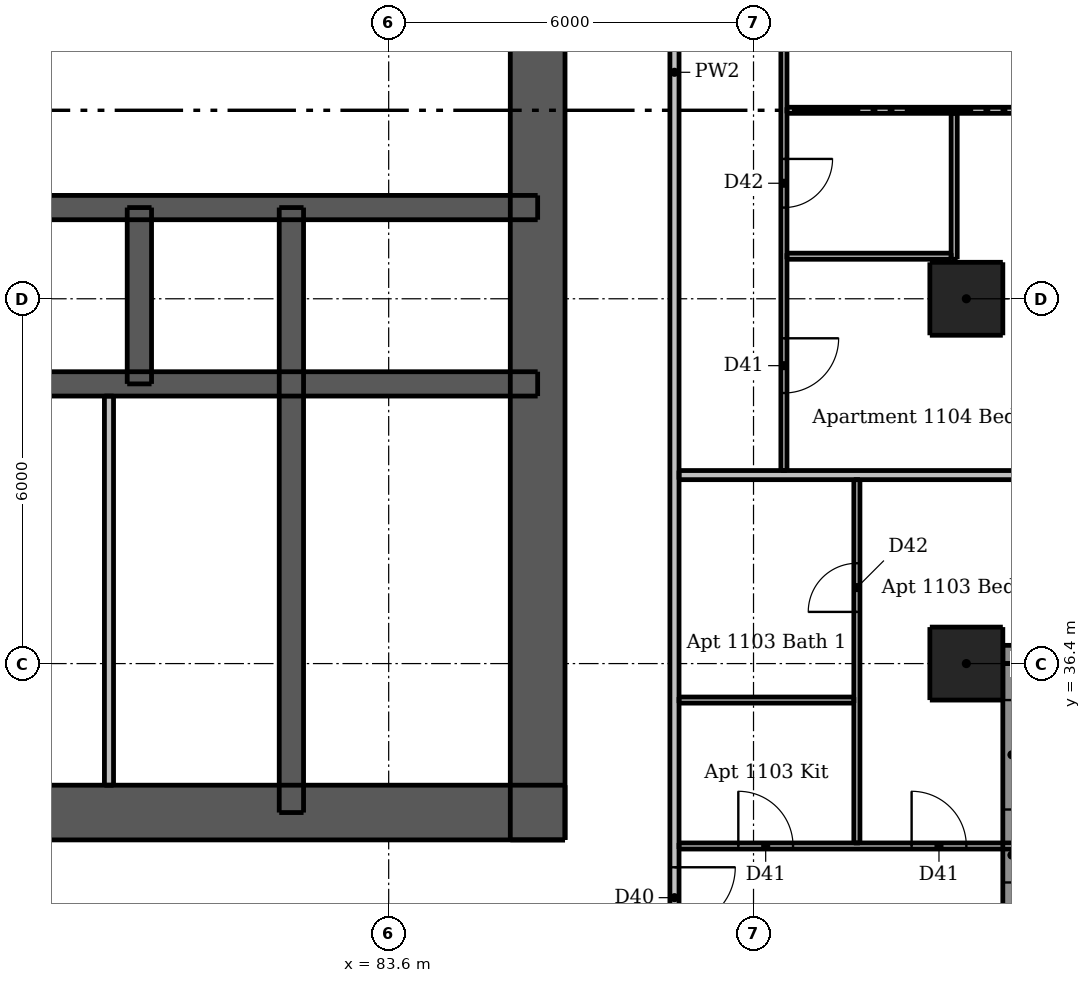
"""IFC4 building model, lengths in metres.
Left out: names, types, materials, properties, quantities, classifications, styles, units other than length and angle.
Written with IfcOpenShell. Run it as: python <this file> out.ifc"""

import sys

from ifc_helpers import new_model, si_unit, direction, frame, frame_2d, origin, origin_2d, place, context, subcontext, project, spatial, rectangle, extrude, element, fill, save


model = new_model("IFC4")
c1 = context("Model", 3, precision=1e-05, world=origin(), true_north=direction((0.0, 1.0)))
c2 = subcontext(c1, "Body", "Model", "MODEL_VIEW")
j1 = project(units=[si_unit("LENGTHUNIT", "METRE"), si_unit("PLANEANGLEUNIT", "RADIAN")], contexts=[c1])
p1 = place(None, origin())
s1 = spatial("IfcSite", under=j1, at=p1, CompositionType="ELEMENT")
p2 = place(p1, origin())
s2 = spatial("IfcBuilding", under=s1, at=p2, CompositionType="ELEMENT")
p3 = place(p2, frame((0.0, 0.0, 43.3)))
s3 = spatial("IfcBuildingStorey", under=s2, at=p3, CompositionType="ELEMENT", Elevation=43.3)
p4 = place(p3, frame((62.5, 33.95, 0.0), z_axis=(0.0, 0.0, 1.0), x_axis=(1.0, 0.0, 0.0)))
e1 = element("IfcWall", 1, at=p4, inside=s3, PredefinedType="SHEAR", context=c2, shape_type="SweptSolid", body=[
    extrude(rectangle(XDim=24.0, YDim=0.9, at=frame_2d((12.0, 0.0))), origin(), (0.0, 0.0, 1.0), 3.05),
])
p5 = place(p4, frame((2.05, 0.0, 0.0)))
e2 = element("IfcOpeningElement", 2, at=p5, cuts=e1, PredefinedType="OPENING", context=c2, shape_type="SweptSolid", body=[
    extrude(rectangle(XDim=1.1, YDim=2.1, at=frame_2d((0.55, 1.05))), frame((0.0, 0.46, 0.0), z_axis=(0.0, -1.0, 0.0), x_axis=(1.0, 0.0, 0.0)), (0.0, 0.0, 1.0), 0.92),
])
p6 = place(p4, frame((20.85, 0.0, 0.0)))
e3 = element("IfcOpeningElement", 3, at=p6, cuts=e1, PredefinedType="OPENING", context=c2, shape_type="SweptSolid", body=[
    extrude(rectangle(XDim=1.1, YDim=2.1, at=frame_2d((0.55, 1.05))), frame((0.0, 0.46, 0.0), z_axis=(0.0, -1.0, 0.0), x_axis=(1.0, 0.0, 0.0)), (0.0, 0.0, 1.0), 0.92),
])
p7 = place(p4, frame((8.0, 0.0, 0.0)))
e4 = element("IfcOpeningElement", 4, at=p7, cuts=e1, PredefinedType="OPENING", context=c2, shape_type="SweptSolid", body=[
    extrude(rectangle(XDim=1.1, YDim=2.1, at=frame_2d((0.55, 1.05))), frame((0.0, 0.46, 0.0), z_axis=(0.0, -1.0, 0.0), x_axis=(1.0, 0.0, 0.0)), (0.0, 0.0, 1.0), 0.92),
])
p8 = place(p4, frame((17.488, 0.0, 0.0)))
e5 = element("IfcOpeningElement", 5, at=p8, cuts=e1, PredefinedType="OPENING", context=c2, shape_type="SweptSolid", body=[
    extrude(rectangle(XDim=0.9, YDim=2.1, at=frame_2d((0.45, 1.05))), frame((0.0, 0.46, 0.0), z_axis=(0.0, -1.0, 0.0), x_axis=(1.0, 0.0, 0.0)), (0.0, 0.0, 1.0), 0.92),
])
p9 = place(p3, frame((86.05, 33.5, 0.0), z_axis=(0.0, 0.0, 1.0), x_axis=(0.0, 1.0, 0.0)))
e6 = element("IfcWall", 6, at=p9, inside=s3, PredefinedType="SHEAR", context=c2, shape_type="SweptSolid", body=[
    extrude(rectangle(XDim=24.0, YDim=0.9, at=frame_2d((12.0, 0.0))), origin(), (0.0, 0.0, 1.0), 3.05),
])
p10 = place(p9, frame((11.2, 0.0, 0.0)))
e7 = element("IfcOpeningElement", 7, at=p10, cuts=e6, PredefinedType="OPENING", context=c2, shape_type="SweptSolid", body=[
    extrude(rectangle(XDim=1.6, YDim=2.1, at=frame_2d((0.8, 1.05))), frame((0.0, 0.46, 0.0), z_axis=(0.0, -1.0, 0.0), x_axis=(1.0, 0.0, 0.0)), (0.0, 0.0, 1.0), 0.92),
])
p11 = place(p3, frame((62.95, 41.0, 0.0), z_axis=(0.0, 0.0, 1.0), x_axis=(1.0, 0.0, 0.0)))
e8 = element("IfcWall", 8, at=p11, inside=s3, PredefinedType="SHEAR", context=c2, shape_type="SweptSolid", body=[
    extrude(rectangle(XDim=23.1, YDim=0.4, at=frame_2d((11.55, 0.0))), origin(), (0.0, 0.0, 1.0), 3.05),
])
p12 = place(p3, frame((62.95, 43.9, 0.0), z_axis=(0.0, 0.0, 1.0), x_axis=(1.0, 0.0, 0.0)))
e9 = element("IfcWall", 9, at=p12, inside=s3, PredefinedType="SHEAR", context=c2, shape_type="SweptSolid", body=[
    extrude(rectangle(XDim=23.1, YDim=0.4, at=frame_2d((11.55, 0.0))), origin(), (0.0, 0.0, 1.0), 3.05),
])
p13 = place(p12, frame((1.088, 0.0, 0.0)))
e10 = element("IfcOpeningElement", 10, at=p13, cuts=e9, PredefinedType="OPENING", context=c2, shape_type="SweptSolid", body=[
    extrude(rectangle(XDim=0.9, YDim=2.1, at=frame_2d((0.45, 1.05))), frame((0.0, 0.21, 0.0), z_axis=(0.0, -1.0, 0.0), x_axis=(1.0, 0.0, 0.0)), (0.0, 0.0, 1.0), 0.42),
])
p14 = place(p12, frame((2.838, 0.0, 0.0)))
e11 = element("IfcOpeningElement", 11, at=p14, cuts=e9, PredefinedType="OPENING", context=c2, shape_type="SweptSolid", body=[
    extrude(rectangle(XDim=0.8, YDim=2.1, at=frame_2d((0.4, 1.05))), frame((0.0, 0.21, 0.0), z_axis=(0.0, -1.0, 0.0), x_axis=(1.0, 0.0, 0.0)), (0.0, 0.0, 1.0), 0.42),
])
p15 = place(p12, frame((20.5, 0.0, 0.0)))
e12 = element("IfcOpeningElement", 12, at=p15, cuts=e9, PredefinedType="OPENING", context=c2, shape_type="SweptSolid", body=[
    extrude(rectangle(XDim=0.9, YDim=2.1, at=frame_2d((0.45, 1.05))), frame((0.0, 0.21, 0.0), z_axis=(0.0, -1.0, 0.0), x_axis=(1.0, 0.0, 0.0)), (0.0, 0.0, 1.0), 0.42),
])
p16 = place(p12, frame((4.75, 0.0, 0.0)))
e13 = element("IfcOpeningElement", 13, at=p16, cuts=e9, PredefinedType="OPENING", context=c2, shape_type="SweptSolid", body=[
    extrude(rectangle(XDim=1.1, YDim=2.1, at=frame_2d((0.55, 1.05))), frame((0.0, 0.21, 0.0), z_axis=(0.0, -1.0, 0.0), x_axis=(1.0, 0.0, 0.0)), (0.0, 0.0, 1.0), 0.42),
])
p17 = place(p12, frame((7.25, 0.0, 0.0)))
e14 = element("IfcOpeningElement", 14, at=p17, cuts=e9, PredefinedType="OPENING", context=c2, shape_type="SweptSolid", body=[
    extrude(rectangle(XDim=1.1, YDim=2.1, at=frame_2d((0.55, 1.05))), frame((0.0, 0.21, 0.0), z_axis=(0.0, -1.0, 0.0), x_axis=(1.0, 0.0, 0.0)), (0.0, 0.0, 1.0), 0.42),
])
p18 = place(p12, frame((9.75, 0.0, 0.0)))
e15 = element("IfcOpeningElement", 15, at=p18, cuts=e9, PredefinedType="OPENING", context=c2, shape_type="SweptSolid", body=[
    extrude(rectangle(XDim=1.1, YDim=2.1, at=frame_2d((0.55, 1.05))), frame((0.0, 0.21, 0.0), z_axis=(0.0, -1.0, 0.0), x_axis=(1.0, 0.0, 0.0)), (0.0, 0.0, 1.0), 0.42),
])
p19 = place(p12, frame((12.25, 0.0, 0.0)))
e16 = element("IfcOpeningElement", 16, at=p19, cuts=e9, PredefinedType="OPENING", context=c2, shape_type="SweptSolid", body=[
    extrude(rectangle(XDim=1.1, YDim=2.1, at=frame_2d((0.55, 1.05))), frame((0.0, 0.21, 0.0), z_axis=(0.0, -1.0, 0.0), x_axis=(1.0, 0.0, 0.0)), (0.0, 0.0, 1.0), 0.42),
])
p20 = place(p12, frame((14.75, 0.0, 0.0)))
e17 = element("IfcOpeningElement", 17, at=p20, cuts=e9, PredefinedType="OPENING", context=c2, shape_type="SweptSolid", body=[
    extrude(rectangle(XDim=1.1, YDim=2.1, at=frame_2d((0.55, 1.05))), frame((0.0, 0.21, 0.0), z_axis=(0.0, -1.0, 0.0), x_axis=(1.0, 0.0, 0.0)), (0.0, 0.0, 1.0), 0.42),
])
p21 = place(p12, frame((17.25, 0.0, 0.0)))
e18 = element("IfcOpeningElement", 18, at=p21, cuts=e9, PredefinedType="OPENING", context=c2, shape_type="SweptSolid", body=[
    extrude(rectangle(XDim=1.1, YDim=2.1, at=frame_2d((0.55, 1.05))), frame((0.0, 0.21, 0.0), z_axis=(0.0, -1.0, 0.0), x_axis=(1.0, 0.0, 0.0)), (0.0, 0.0, 1.0), 0.42),
])
p22 = place(p3, frame((82.0, 33.95, 0.0), z_axis=(0.0, 0.0, 1.0), x_axis=(0.0, 1.0, 0.0)))
e19 = element("IfcWall", 19, at=p22, inside=s3, PredefinedType="SHEAR", context=c2, shape_type="SweptSolid", body=[
    extrude(rectangle(XDim=9.95, YDim=0.4, at=frame_2d((4.975, 0.0))), origin(), (0.0, 0.0, 1.0), 3.05),
])
p23 = place(p3, frame((79.5, 41.0, 0.0), z_axis=(0.0, 0.0, 1.0), x_axis=(0.0, 1.0, 0.0)))
e20 = element("IfcWall", 20, at=p23, inside=s3, PredefinedType="SHEAR", context=c2, shape_type="SweptSolid", body=[
    extrude(rectangle(XDim=2.9, YDim=0.4, at=frame_2d((1.45, 0.0))), origin(), (0.0, 0.0, 1.0), 3.05),
])
for number, where, z_axis, x_axis in (
    (21, (93.1, 36.4, 0.0), (0.0, 0.0, 1.0), (1.0, 0.0, 0.0)),
    (22, (93.1, 42.4, 0.0), (0.0, 0.0, 1.0), (1.0, 0.0, 0.0)),
):
    element("IfcColumn", number, at=place(p3, frame(where, z_axis=z_axis, x_axis=x_axis)), inside=s3, PredefinedType="COLUMN", context=c2, shape_type="SweptSolid", body=[
        extrude(rectangle(XDim=1.2, YDim=1.2, at=origin_2d()), origin(), (0.0, 0.0, 1.0), 3.05),
    ])
p24 = place(p3, frame((93.7, 36.55, 0.0), z_axis=(0.0, 0.0, 1.0), x_axis=(1.0, 0.0, 0.0)))
e23 = element("IfcWall", 23, at=p24, inside=s3, PredefinedType="SOLIDWALL", context=c2, shape_type="SweptSolid", body=[
    extrude(rectangle(XDim=1.8, YDim=0.3, at=frame_2d((0.9, 0.0))), origin(), (0.0, 0.0, 1.0), 3.05),
])
p25 = place(p3, frame((93.85, 30.1, 0.0), z_axis=(0.0, 0.0, 1.0), x_axis=(0.0, 1.0, 0.0)))
e24 = element("IfcWall", 24, at=p25, inside=s3, PredefinedType="SOLIDWALL", context=c2, shape_type="SweptSolid", body=[
    extrude(rectangle(XDim=6.3, YDim=0.3, at=frame_2d((3.15, 0.0))), origin(), (0.0, 0.0, 1.0), 3.05),
])
p26 = place(p25, frame((0.9, 0.0, 0.15)))
e25 = element("IfcOpeningElement", 25, at=p26, cuts=e24, PredefinedType="OPENING", context=c2, shape_type="SweptSolid", body=[
    extrude(rectangle(XDim=1.8, YDim=2.1, at=frame_2d((0.9, 1.05))), frame((0.0, 0.16, 0.0), z_axis=(0.0, -1.0, 0.0), x_axis=(1.0, 0.0, 0.0)), (0.0, 0.0, 1.0), 0.32),
])
p27 = place(p25, frame((3.9, 0.0, 0.15)))
e26 = element("IfcOpeningElement", 26, at=p27, cuts=e24, PredefinedType="OPENING", context=c2, shape_type="SweptSolid", body=[
    extrude(rectangle(XDim=1.8, YDim=2.1, at=frame_2d((0.9, 1.05))), frame((0.0, 0.16, 0.0), z_axis=(0.0, -1.0, 0.0), x_axis=(1.0, 0.0, 0.0)), (0.0, 0.0, 1.0), 0.32),
])
p28 = place(p3, frame((79.0, 34.4, 0.0), z_axis=(0.0, 0.0, 1.0), x_axis=(0.0, 1.0, 0.0)))
e27 = element("IfcWall", 27, at=p28, inside=s3, PredefinedType="PLUMBINGWALL", context=c2, shape_type="SweptSolid", body=[
    extrude(rectangle(XDim=6.4, YDim=0.15, at=frame_2d((3.2, 0.0))), origin(), (0.0, 0.0, 1.0), 3.05),
])
p29 = place(p3, frame((90.1, 59.35, 0.0), z_axis=(0.0, 0.0, 1.0), x_axis=(0.0, -1.0, 0.0)))
e28 = element("IfcWall", 28, at=p29, inside=s3, PredefinedType="PARTITIONING", context=c2, shape_type="SweptSolid", body=[
    extrude(rectangle(XDim=19.775, YDim=0.1, at=frame_2d((9.888, 0.0))), origin(), (0.0, 0.0, 1.0), 3.05),
])
p30 = place(p29, frame((4.45, 0.0, 0.0)))
e29 = element("IfcOpeningElement", 29, at=p30, cuts=e28, PredefinedType="OPENING", context=c2, shape_type="SweptSolid", body=[
    extrude(rectangle(XDim=0.9, YDim=2.1, at=frame_2d((0.45, 1.05))), frame((0.0, 0.06, 0.0), z_axis=(0.0, -1.0, 0.0), x_axis=(1.0, 0.0, 0.0)), (0.0, 0.0, 1.0), 0.12),
])
p31 = place(p29, frame((0.55, 0.0, 0.0)))
e30 = element("IfcOpeningElement", 30, at=p31, cuts=e28, PredefinedType="OPENING", context=c2, shape_type="SweptSolid", body=[
    extrude(rectangle(XDim=0.9, YDim=2.1, at=frame_2d((0.45, 1.05))), frame((0.0, 0.06, 0.0), z_axis=(0.0, -1.0, 0.0), x_axis=(1.0, 0.0, 0.0)), (0.0, 0.0, 1.0), 0.12),
])
p32 = place(p29, frame((17.6, 0.0, 0.0)))
e31 = element("IfcOpeningElement", 31, at=p32, cuts=e28, PredefinedType="OPENING", context=c2, shape_type="SweptSolid", body=[
    extrude(rectangle(XDim=0.9, YDim=2.1, at=frame_2d((0.45, 1.05))), frame((0.0, 0.06, 0.0), z_axis=(0.0, -1.0, 0.0), x_axis=(1.0, 0.0, 0.0)), (0.0, 0.0, 1.0), 0.12),
])
p33 = place(p29, frame((11.6, 0.0, 0.0)))
e32 = element("IfcOpeningElement", 32, at=p33, cuts=e28, PredefinedType="OPENING", context=c2, shape_type="SweptSolid", body=[
    extrude(rectangle(XDim=0.9, YDim=2.1, at=frame_2d((0.45, 1.05))), frame((0.0, 0.06, 0.0), z_axis=(0.0, -1.0, 0.0), x_axis=(1.0, 0.0, 0.0)), (0.0, 0.0, 1.0), 0.12),
])
p34 = place(p29, frame((14.65, 0.0, 0.0)))
e33 = element("IfcOpeningElement", 33, at=p34, cuts=e28, PredefinedType="OPENING", context=c2, shape_type="SweptSolid", body=[
    extrude(rectangle(XDim=0.8, YDim=2.1, at=frame_2d((0.4, 1.05))), frame((0.0, 0.06, 0.0), z_axis=(0.0, -1.0, 0.0), x_axis=(1.0, 0.0, 0.0)), (0.0, 0.0, 1.0), 0.12),
])
p35 = place(p29, frame((8.65, 0.0, 0.0)))
e34 = element("IfcOpeningElement", 34, at=p35, cuts=e28, PredefinedType="OPENING", context=c2, shape_type="SweptSolid", body=[
    extrude(rectangle(XDim=0.8, YDim=2.1, at=frame_2d((0.4, 1.05))), frame((0.0, 0.06, 0.0), z_axis=(0.0, -1.0, 0.0), x_axis=(1.0, 0.0, 0.0)), (0.0, 0.0, 1.0), 0.12),
])
p36 = place(p3, frame((91.3, 33.45, 0.0), z_axis=(0.0, 0.0, 1.0), x_axis=(0.0, 1.0, 0.0)))
e35 = element("IfcWall", 35, at=p36, inside=s3, PredefinedType="PARTITIONING", context=c2, shape_type="SweptSolid", body=[
    extrude(rectangle(XDim=5.975, YDim=0.1, at=frame_2d((2.988, 0.0))), origin(), (0.0, 0.0, 1.0), 3.05),
])
p37 = place(p36, frame((3.8, 0.0, 0.0)))
e36 = element("IfcOpeningElement", 36, at=p37, cuts=e35, PredefinedType="OPENING", context=c2, shape_type="SweptSolid", body=[
    extrude(rectangle(XDim=0.8, YDim=2.1, at=frame_2d((0.4, 1.05))), frame((0.0, 0.06, 0.0), z_axis=(0.0, -1.0, 0.0), x_axis=(1.0, 0.0, 0.0)), (0.0, 0.0, 1.0), 0.12),
])
p38 = place(p3, frame((92.9, 43.05, 0.0), z_axis=(0.0, 0.0, 1.0), x_axis=(0.0, 1.0, 0.0)))
e37 = element("IfcWall", 37, at=p38, inside=s3, PredefinedType="PARTITIONING", context=c2, shape_type="SweptSolid", body=[
    extrude(rectangle(XDim=2.4, YDim=0.1, at=frame_2d((1.2, 0.0))), origin(), (0.0, 0.0, 1.0), 3.05),
])
p39 = place(p3, frame((90.15, 45.5, 0.0), z_axis=(0.0, 0.0, 1.0), x_axis=(1.0, 0.0, 0.0)))
e38 = element("IfcWall", 38, at=p39, inside=s3, PredefinedType="PARTITIONING", context=c2, shape_type="SweptSolid", body=[
    extrude(rectangle(XDim=8.35, YDim=0.1, at=frame_2d((4.175, 0.0))), origin(), (0.0, 0.0, 1.0), 3.05),
])
p40 = place(p3, frame((90.15, 43.1, 0.0), z_axis=(0.0, 0.0, 1.0), x_axis=(1.0, 0.0, 0.0)))
e39 = element("IfcWall", 39, at=p40, inside=s3, PredefinedType="PARTITIONING", context=c2, shape_type="SweptSolid", body=[
    extrude(rectangle(XDim=2.7, YDim=0.1, at=frame_2d((1.35, 0.0))), origin(), (0.0, 0.0, 1.0), 3.05),
])
p41 = place(p3, frame((88.375, 35.8, 0.0), z_axis=(0.0, 0.0, 1.0), x_axis=(1.0, 0.0, 0.0)))
e40 = element("IfcWall", 40, at=p41, inside=s3, PredefinedType="PARTITIONING", context=c2, shape_type="SweptSolid", body=[
    extrude(rectangle(XDim=2.875, YDim=0.1, at=frame_2d((1.438, 0.0))), origin(), (0.0, 0.0, 1.0), 3.05),
])
p42 = place(p3, frame((88.375, 33.4, 0.0), z_axis=(0.0, 0.0, 1.0), x_axis=(1.0, 0.0, 0.0)))
e41 = element("IfcWall", 41, at=p42, inside=s3, PredefinedType="PARTITIONING", context=c2, shape_type="SweptSolid", body=[
    extrude(rectangle(XDim=5.625, YDim=0.1, at=frame_2d((2.812, 0.0))), origin(), (0.0, 0.0, 1.0), 3.05),
])
p43 = place(p42, frame((0.975, 0.0, 0.0)))
e42 = element("IfcOpeningElement", 42, at=p43, cuts=e41, PredefinedType="OPENING", context=c2, shape_type="SweptSolid", body=[
    extrude(rectangle(XDim=0.9, YDim=2.1, at=frame_2d((0.45, 1.05))), frame((0.0, 0.06, 0.0), z_axis=(0.0, -1.0, 0.0), x_axis=(1.0, 0.0, 0.0)), (0.0, 0.0, 1.0), 0.12),
])
p44 = place(p42, frame((3.825, 0.0, 0.0)))
e43 = element("IfcOpeningElement", 43, at=p44, cuts=e41, PredefinedType="OPENING", context=c2, shape_type="SweptSolid", body=[
    extrude(rectangle(XDim=0.9, YDim=2.1, at=frame_2d((0.45, 1.05))), frame((0.0, 0.06, 0.0), z_axis=(0.0, -1.0, 0.0), x_axis=(1.0, 0.0, 0.0)), (0.0, 0.0, 1.0), 0.12),
])
p45 = place(p3, frame((88.3, 60.475, 0.0), z_axis=(0.0, 0.0, 1.0), x_axis=(0.0, -1.0, 0.0)))
e44 = element("IfcWall", 44, at=p45, inside=s3, PredefinedType="PARTITIONING", context=c2, shape_type="SweptSolid", body=[
    extrude(rectangle(XDim=28.7, YDim=0.15, at=frame_2d((14.35, 0.0))), origin(), (0.0, 0.0, 1.0), 3.05),
])
p46 = place(p45, frame((27.425, 0.0, 0.0)))
e45 = element("IfcOpeningElement", 45, at=p46, cuts=e44, PredefinedType="OPENING", context=c2, shape_type="SweptSolid", body=[
    extrude(rectangle(XDim=1.0, YDim=2.1, at=frame_2d((0.5, 1.05))), frame((0.0, 0.085, 0.0), z_axis=(0.0, -1.0, 0.0), x_axis=(1.0, 0.0, 0.0)), (0.0, 0.0, 1.0), 0.17),
])
p47 = place(p45, frame((10.575, 0.0, 0.0)))
e46 = element("IfcOpeningElement", 46, at=p47, cuts=e44, PredefinedType="OPENING", context=c2, shape_type="SweptSolid", body=[
    extrude(rectangle(XDim=1.0, YDim=2.1, at=frame_2d((0.5, 1.05))), frame((0.0, 0.085, 0.0), z_axis=(0.0, -1.0, 0.0), x_axis=(1.0, 0.0, 0.0)), (0.0, 0.0, 1.0), 0.17),
])
p48 = place(p3, frame((88.375, 39.5, 0.0), z_axis=(0.0, 0.0, 1.0), x_axis=(1.0, 0.0, 0.0)))
e47 = element("IfcWall", 47, at=p48, inside=s3, PredefinedType="PARTITIONING", context=c2, shape_type="SweptSolid", body=[
    extrude(rectangle(XDim=7.125, YDim=0.15, at=frame_2d((3.562, 0.0))), origin(), (0.0, 0.0, 1.0), 3.05),
])
p49 = place(p26, origin())
e48 = element("IfcWindow", 48, at=p49, inside=s3, PartitioningType="DOUBLE_PANEL_VERTICAL", PredefinedType="WINDOW", context=c2, shape_type="SweptSolid", body=[
    extrude(rectangle(XDim=1.8, YDim=2.1, at=frame_2d((0.9, 1.05))), frame((0.0, 0.03, 0.0), z_axis=(0.0, -1.0, 0.0), x_axis=(1.0, 0.0, 0.0)), (0.0, 0.0, 1.0), 0.06),
])
fill(e25, e48)
p50 = place(p27, origin())
e49 = element("IfcWindow", 49, at=p50, inside=s3, PartitioningType="DOUBLE_PANEL_VERTICAL", PredefinedType="WINDOW", context=c2, shape_type="SweptSolid", body=[
    extrude(rectangle(XDim=1.8, YDim=2.1, at=frame_2d((0.9, 1.05))), frame((0.0, 0.03, 0.0), z_axis=(0.0, -1.0, 0.0), x_axis=(1.0, 0.0, 0.0)), (0.0, 0.0, 1.0), 0.06),
])
fill(e26, e49)
p51 = place(p6, origin())
e50 = element("IfcDoor", 50, at=p51, inside=s3, OperationType="SINGLE_SWING_RIGHT", PredefinedType="DOOR", context=c2, shape_type="SweptSolid", body=[
    extrude(rectangle(XDim=1.1, YDim=2.1, at=frame_2d((0.55, 1.05))), frame((0.0, 0.438, 0.0), z_axis=(0.0, -1.0, 0.0), x_axis=(1.0, 0.0, 0.0)), (0.0, 0.0, 1.0), 0.05),
])
fill(e3, e50)
p52 = place(p10, origin())
e51 = element("IfcDoor", 51, at=p52, inside=s3, OperationType="DOUBLE_DOOR_SINGLE_SWING", PredefinedType="DOOR", context=c2, shape_type="SweptSolid", body=[
    extrude(rectangle(XDim=1.6, YDim=2.1, at=frame_2d((0.8, 1.05))), frame((0.0, 0.438, 0.0), z_axis=(0.0, -1.0, 0.0), x_axis=(1.0, 0.0, 0.0)), (0.0, 0.0, 1.0), 0.05),
])
fill(e7, e51)
p53 = place(p8, origin())
e52 = element("IfcDoor", 52, at=p53, inside=s3, OperationType="SINGLE_SWING_LEFT", PredefinedType="DOOR", context=c2, shape_type="SweptSolid", body=[
    extrude(rectangle(XDim=0.9, YDim=2.1, at=frame_2d((0.45, 1.05))), frame((0.0, 0.438, 0.0), z_axis=(0.0, -1.0, 0.0), x_axis=(1.0, 0.0, 0.0)), (0.0, 0.0, 1.0), 0.05),
])
fill(e5, e52)
p54 = place(p15, origin())
e53 = element("IfcDoor", 53, at=p54, inside=s3, OperationType="SINGLE_SWING_LEFT", PredefinedType="DOOR", context=c2, shape_type="SweptSolid", body=[
    extrude(rectangle(XDim=0.9, YDim=2.1, at=frame_2d((0.45, 1.05))), frame((0.0, -0.138, 0.0), z_axis=(0.0, -1.0, 0.0), x_axis=(1.0, 0.0, 0.0)), (0.0, 0.0, 1.0), 0.05),
])
fill(e12, e53)
p55 = place(p20, origin())
e54 = element("IfcDoor", 54, at=p55, inside=s3, OperationType="DOUBLE_DOOR_SLIDING", PredefinedType="DOOR", context=c2, shape_type="SweptSolid", body=[
    extrude(rectangle(XDim=1.1, YDim=2.1, at=frame_2d((0.55, 1.05))), frame((0.0, 0.025, 0.0), z_axis=(0.0, -1.0, 0.0), x_axis=(1.0, 0.0, 0.0)), (0.0, 0.0, 1.0), 0.05),
])
fill(e17, e54)
p56 = place(p21, origin())
e55 = element("IfcDoor", 55, at=p56, inside=s3, OperationType="DOUBLE_DOOR_SLIDING", PredefinedType="DOOR", context=c2, shape_type="SweptSolid", body=[
    extrude(rectangle(XDim=1.1, YDim=2.1, at=frame_2d((0.55, 1.05))), frame((0.0, 0.025, 0.0), z_axis=(0.0, -1.0, 0.0), x_axis=(1.0, 0.0, 0.0)), (0.0, 0.0, 1.0), 0.05),
])
fill(e18, e55)
p57 = place(p46, origin())
e56 = element("IfcDoor", 56, at=p57, inside=s3, OperationType="SINGLE_SWING_LEFT", PredefinedType="DOOR", context=c2, shape_type="SweptSolid", body=[
    extrude(rectangle(XDim=1.0, YDim=2.1, at=frame_2d((0.5, 1.05))), frame((0.0, 0.025, 0.0), z_axis=(0.0, -1.0, 0.0), x_axis=(1.0, 0.0, 0.0)), (0.0, 0.0, 1.0), 0.05),
])
fill(e45, e56)
p58 = place(p43, origin())
e57 = element("IfcDoor", 57, at=p58, inside=s3, OperationType="SINGLE_SWING_LEFT", PredefinedType="DOOR", context=c2, shape_type="SweptSolid", body=[
    extrude(rectangle(XDim=0.9, YDim=2.1, at=frame_2d((0.45, 1.05))), frame((0.0, 0.025, 0.0), z_axis=(0.0, -1.0, 0.0), x_axis=(1.0, 0.0, 0.0)), (0.0, 0.0, 1.0), 0.05),
])
fill(e42, e57)
p59 = place(p44, origin())
e58 = element("IfcDoor", 58, at=p59, inside=s3, OperationType="SINGLE_SWING_LEFT", PredefinedType="DOOR", context=c2, shape_type="SweptSolid", body=[
    extrude(rectangle(XDim=0.9, YDim=2.1, at=frame_2d((0.45, 1.05))), frame((0.0, 0.025, 0.0), z_axis=(0.0, -1.0, 0.0), x_axis=(1.0, 0.0, 0.0)), (0.0, 0.0, 1.0), 0.05),
])
fill(e43, e58)
p60 = place(p37, origin())
e59 = element("IfcDoor", 59, at=p60, inside=s3, OperationType="SINGLE_SWING_LEFT", PredefinedType="DOOR", context=c2, shape_type="SweptSolid", body=[
    extrude(rectangle(XDim=0.8, YDim=2.1, at=frame_2d((0.4, 1.05))), frame((0.0, 0.025, 0.0), z_axis=(0.0, -1.0, 0.0), x_axis=(1.0, 0.0, 0.0)), (0.0, 0.0, 1.0), 0.05),
])
fill(e36, e59)
p61 = place(p32, origin())
e60 = element("IfcDoor", 60, at=p61, inside=s3, OperationType="SINGLE_SWING_LEFT", PredefinedType="DOOR", context=c2, shape_type="SweptSolid", body=[
    extrude(rectangle(XDim=0.9, YDim=2.1, at=frame_2d((0.45, 1.05))), frame((0.0, 0.025, 0.0), z_axis=(0.0, -1.0, 0.0), x_axis=(1.0, 0.0, 0.0)), (0.0, 0.0, 1.0), 0.05),
])
fill(e31, e60)
p62 = place(p34, origin())
e61 = element("IfcDoor", 61, at=p62, inside=s3, OperationType="SINGLE_SWING_LEFT", PredefinedType="DOOR", context=c2, shape_type="SweptSolid", body=[
    extrude(rectangle(XDim=0.8, YDim=2.1, at=frame_2d((0.4, 1.05))), frame((0.0, 0.025, 0.0), z_axis=(0.0, -1.0, 0.0), x_axis=(1.0, 0.0, 0.0)), (0.0, 0.0, 1.0), 0.05),
])
fill(e33, e61)
save(model, sys.argv[1])
